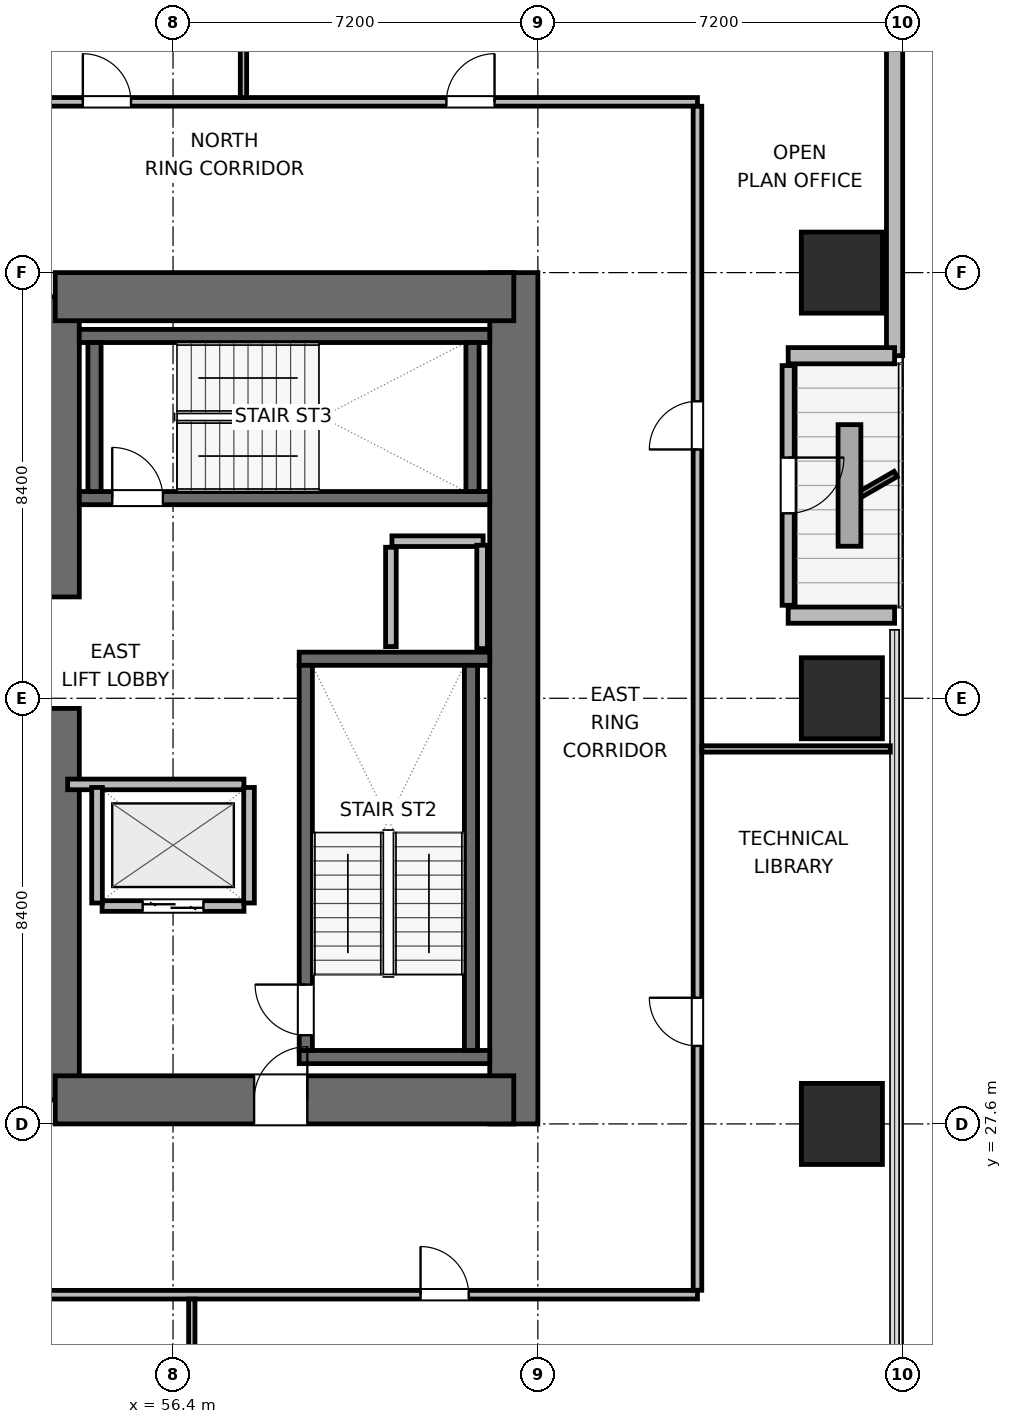
"""IFC4 building model, lengths in metres.
Left out: names, types, materials, properties, quantities, classifications, styles, units other than length and angle.
Written with IfcOpenShell. Run it as: python <this file> out.ifc"""

import sys

from ifc_helpers import new_model, si_unit, direction, frame, frame_2d, origin, origin_2d, place, context, subcontext, project, spatial, rectangle, extrude, element, fill, save


model = new_model("IFC4")
c1 = context("Model", 3, precision=1e-05, world=origin(), true_north=direction((0.0, 1.0)))
c2 = subcontext(c1, "Body", "Model", "MODEL_VIEW")
j1 = project(units=[si_unit("LENGTHUNIT", "METRE"), si_unit("PLANEANGLEUNIT", "RADIAN")], contexts=[c1])
p1 = place(None, origin())
s1 = spatial("IfcSite", under=j1, at=p1, CompositionType="ELEMENT")
p2 = place(p1, origin())
s2 = spatial("IfcBuilding", under=s1, at=p2, CompositionType="ELEMENT")
p3 = place(p2, frame((0.0, 0.0, 85.8)))
s3 = spatial("IfcBuildingStorey", under=s2, at=p3, CompositionType="ELEMENT", Elevation=85.8)
p4 = place(p3, frame((54.075, 28.075, 0.0), z_axis=(0.0, 0.0, 1.0), x_axis=(0.0, 1.0, 0.0)))
e1 = element("IfcWall", 1, at=p4, inside=s3, PredefinedType="SHEAR", context=c2, shape_type="SweptSolid", body=[
    extrude(rectangle(XDim=7.725, YDim=0.95, at=frame_2d((3.863, 0.0))), origin(), (0.0, 0.0, 1.0), 3.9),
])
p5 = place(p3, frame((54.075, 38.0, 0.0), z_axis=(0.0, 0.0, 1.0), x_axis=(0.0, 1.0, 0.0)))
e2 = element("IfcWall", 2, at=p5, inside=s3, PredefinedType="SHEAR", context=c2, shape_type="SweptSolid", body=[
    extrude(rectangle(XDim=5.925, YDim=0.95, at=frame_2d((2.962, 0.0))), origin(), (0.0, 0.0, 1.0), 3.9),
])
p6 = place(p3, frame((63.125, 27.6, 0.0), z_axis=(0.0, 0.0, 1.0), x_axis=(0.0, 1.0, 0.0)))
e3 = element("IfcWall", 3, at=p6, inside=s3, PredefinedType="SHEAR", context=c2, shape_type="SweptSolid", body=[
    extrude(rectangle(XDim=16.8, YDim=0.95, at=frame_2d((8.4, 0.0))), origin(), (0.0, 0.0, 1.0), 3.9),
])
p7 = place(p3, frame((54.075, 28.075, 0.0), z_axis=(0.0, 0.0, 1.0), x_axis=(1.0, 0.0, 0.0)))
e4 = element("IfcWall", 4, at=p7, inside=s3, PredefinedType="SHEAR", context=c2, shape_type="SweptSolid", body=[
    extrude(rectangle(XDim=9.05, YDim=0.95, at=frame_2d((4.525, 0.0))), origin(), (0.0, 0.0, 1.0), 3.9),
])
p8 = place(p7, frame((3.925, 0.0, 0.0)))
e5 = element("IfcOpeningElement", 5, at=p8, cuts=e4, PredefinedType="OPENING", context=c2, shape_type="SweptSolid", body=[
    extrude(rectangle(XDim=1.05, YDim=2.04, at=frame_2d((0.525, 1.02))), frame((0.0, 0.485, 0.0), z_axis=(0.0, -1.0, 0.0), x_axis=(1.0, 0.0, 0.0)), (0.0, 0.0, 1.0), 0.97),
])
p9 = place(p3, frame((54.075, 43.925, 0.0), z_axis=(0.0, 0.0, 1.0), x_axis=(1.0, 0.0, 0.0)))
e6 = element("IfcWall", 6, at=p9, inside=s3, PredefinedType="SHEAR", context=c2, shape_type="SweptSolid", body=[
    extrude(rectangle(XDim=9.05, YDim=0.95, at=frame_2d((4.525, 0.0))), origin(), (0.0, 0.0, 1.0), 3.9),
])
for number, where, z_axis, x_axis in (
    (7, (58.89, 28.92, 0.0), (0.0, 0.0, 1.0), (1.0, 0.0, 0.0)),
    (8, (58.89, 36.78, 0.0), (0.0, 0.0, 1.0), (1.0, 0.0, 0.0)),
):
    element("IfcWall", number, at=place(p3, frame(where, z_axis=z_axis, x_axis=x_axis)), inside=s3, PredefinedType="SHEAR", context=c2, shape_type="SweptSolid", body=[
        extrude(rectangle(XDim=3.76, YDim=0.26, at=frame_2d((1.88, 0.0))), origin(), (0.0, 0.0, 1.0), 3.9),
    ])
p10 = place(p3, frame((59.02, 29.05, 0.0), z_axis=(0.0, 0.0, 1.0), x_axis=(0.0, 1.0, 0.0)))
e9 = element("IfcWall", 9, at=p10, inside=s3, PredefinedType="SHEAR", context=c2, shape_type="SweptSolid", body=[
    extrude(rectangle(XDim=7.6, YDim=0.26, at=frame_2d((3.8, 0.0))), origin(), (0.0, 0.0, 1.0), 3.9),
])
p11 = place(p10, frame((0.3, 0.0, 0.0)))
e10 = element("IfcOpeningElement", 10, at=p11, cuts=e9, PredefinedType="OPENING", context=c2, shape_type="SweptSolid", body=[
    extrude(rectangle(XDim=1.0, YDim=2.04, at=frame_2d((0.5, 1.02))), frame((0.0, 0.14, 0.0), z_axis=(0.0, -1.0, 0.0), x_axis=(1.0, 0.0, 0.0)), (0.0, 0.0, 1.0), 0.28),
])
p12 = place(p3, frame((62.28, 29.05, 0.0), z_axis=(0.0, 0.0, 1.0), x_axis=(0.0, 1.0, 0.0)))
e11 = element("IfcWall", 11, at=p12, inside=s3, PredefinedType="SHEAR", context=c2, shape_type="SweptSolid", body=[
    extrude(rectangle(XDim=7.6, YDim=0.26, at=frame_2d((3.8, 0.0))), origin(), (0.0, 0.0, 1.0), 3.9),
])
p13 = place(p3, frame((54.55, 39.95, 0.0), z_axis=(0.0, 0.0, 1.0), x_axis=(1.0, 0.0, 0.0)))
e12 = element("IfcWall", 12, at=p13, inside=s3, PredefinedType="SHEAR", context=c2, shape_type="SweptSolid", body=[
    extrude(rectangle(XDim=8.1, YDim=0.26, at=frame_2d((4.05, 0.0))), origin(), (0.0, 0.0, 1.0), 3.9),
])
p14 = place(p13, frame((0.65, 0.0, 0.0)))
e13 = element("IfcOpeningElement", 13, at=p14, cuts=e12, PredefinedType="OPENING", context=c2, shape_type="SweptSolid", body=[
    extrude(rectangle(XDim=1.0, YDim=2.04, at=frame_2d((0.5, 1.02))), frame((0.0, 0.14, 0.0), z_axis=(0.0, -1.0, 0.0), x_axis=(1.0, 0.0, 0.0)), (0.0, 0.0, 1.0), 0.28),
])
p15 = place(p3, frame((54.55, 43.15, 0.0), z_axis=(0.0, 0.0, 1.0), x_axis=(1.0, 0.0, 0.0)))
e14 = element("IfcWall", 14, at=p15, inside=s3, PredefinedType="SHEAR", context=c2, shape_type="SweptSolid", body=[
    extrude(rectangle(XDim=8.1, YDim=0.26, at=frame_2d((4.05, 0.0))), origin(), (0.0, 0.0, 1.0), 3.9),
])
for number, where, z_axis, x_axis in (
    (15, (54.85, 40.08, 0.0), (0.0, 0.0, 1.0), (0.0, 1.0, 0.0)),
    (16, (62.31, 40.08, 0.0), (0.0, 0.0, 1.0), (0.0, 1.0, 0.0)),
):
    element("IfcWall", number, at=place(p3, frame(where, z_axis=z_axis, x_axis=x_axis)), inside=s3, PredefinedType="SHEAR", context=c2, shape_type="SweptSolid", body=[
        extrude(rectangle(XDim=2.94, YDim=0.26, at=frame_2d((1.47, 0.0))), origin(), (0.0, 0.0, 1.0), 3.9),
    ])
for number, where, z_axis, x_axis in (
    (17, (69.6, 27.6, 0.0), (0.0, 0.0, 1.0), (1.0, 0.0, 0.0)),
    (18, (69.6, 36.0, 0.0), (0.0, 0.0, 1.0), (1.0, 0.0, 0.0)),
    (19, (69.6, 44.4, 0.0), (0.0, 0.0, 1.0), (1.0, 0.0, 0.0)),
):
    element("IfcColumn", number, at=place(p3, frame(where, z_axis=z_axis, x_axis=x_axis)), inside=s3, PredefinedType="COLUMN", context=c2, shape_type="SweptSolid", body=[
        extrude(rectangle(XDim=1.6, YDim=1.6, at=origin_2d()), origin(), (0.0, 0.0, 1.0), 3.9),
    ])
p16 = place(p3, frame((70.64, 56.979, 0.0), z_axis=(0.0, 0.0, 1.0), x_axis=(0.0, -1.0, 0.0)))
e20 = element("IfcWall", 20, at=p16, inside=s3, PredefinedType="SOLIDWALL", context=c2, shape_type="SweptSolid", body=[
    extrude(rectangle(XDim=14.219, YDim=0.32, at=frame_2d((7.109, 0.0))), origin(), (0.0, 0.0, 1.0), 3.64),
])
p17 = place(p3, frame((70.64, 42.76, 0.0), z_axis=(0.0, 0.0, 1.0), x_axis=(-1.0, 0.0, 0.0)))
e21 = element("IfcWall", 21, at=p17, inside=s3, PredefinedType="SOLIDWALL", context=c2, shape_type="SweptSolid", body=[
    extrude(rectangle(XDim=2.1, YDim=0.32, at=frame_2d((1.05, 0.0))), origin(), (0.0, 0.0, 1.0), 2.875),
])
p18 = place(p3, frame((68.54, 42.565, 0.0), z_axis=(0.0, 0.0, 1.0), x_axis=(0.0, -1.0, 0.0)))
e22 = element("IfcWall", 22, at=p18, inside=s3, PredefinedType="SOLIDWALL", context=c2, shape_type="SweptSolid", body=[
    extrude(rectangle(XDim=4.73, YDim=0.24, at=frame_2d((2.365, 0.0))), origin(), (0.0, 0.0, 1.0), 3.162),
])
p19 = place(p18, frame((1.815, 0.0, 0.0)))
e23 = element("IfcOpeningElement", 23, at=p19, cuts=e22, PredefinedType="OPENING", context=c2, shape_type="SweptSolid", body=[
    extrude(rectangle(XDim=1.1, YDim=2.04, at=frame_2d((0.55, 1.02))), frame((0.0, 0.13, 0.0), z_axis=(0.0, -1.0, 0.0), x_axis=(1.0, 0.0, 0.0)), (0.0, 0.0, 1.0), 0.26),
])
p20 = place(p3, frame((68.54, 37.64, 0.0), z_axis=(0.0, 0.0, 1.0), x_axis=(1.0, 0.0, 0.0)))
e24 = element("IfcWall", 24, at=p20, inside=s3, PredefinedType="SOLIDWALL", context=c2, shape_type="SweptSolid", body=[
    extrude(rectangle(XDim=2.1, YDim=0.32, at=frame_2d((1.05, 0.0))), origin(), (0.0, 0.0, 1.0), 2.875),
])
p21 = place(p3, frame((60.72, 39.1, 0.0), z_axis=(0.0, 0.0, 1.0), x_axis=(1.0, 0.0, 0.0)))
e25 = element("IfcWall", 25, at=p21, inside=s3, PredefinedType="PARTITIONING", context=c2, shape_type="SweptSolid", body=[
    extrude(rectangle(XDim=1.8, YDim=0.21, at=frame_2d((0.9, 0.0))), origin(), (0.0, 0.0, 1.0), 3.64),
])
p22 = place(p3, frame((60.7, 37.02, 0.0), z_axis=(0.0, 0.0, 1.0), x_axis=(0.0, 1.0, 0.0)))
e26 = element("IfcWall", 26, at=p22, inside=s3, PredefinedType="PARTITIONING", context=c2, shape_type="SweptSolid", body=[
    extrude(rectangle(XDim=1.96, YDim=0.21, at=frame_2d((0.98, 0.0))), origin(), (0.0, 0.0, 1.0), 3.64),
])
p23 = place(p3, frame((62.5, 36.98, 0.0), z_axis=(0.0, 0.0, 1.0), x_axis=(0.0, 1.0, 0.0)))
e27 = element("IfcWall", 27, at=p23, inside=s3, PredefinedType="PARTITIONING", context=c2, shape_type="SweptSolid", body=[
    extrude(rectangle(XDim=2.04, YDim=0.21, at=frame_2d((1.02, 0.0))), origin(), (0.0, 0.0, 1.0), 3.64),
])
p24 = place(p3, frame((55.0, 31.9, 0.0), z_axis=(0.0, 0.0, 1.0), x_axis=(1.0, 0.0, 0.0)))
e28 = element("IfcWall", 28, at=p24, inside=s3, PredefinedType="PARTITIONING", context=c2, shape_type="SweptSolid", body=[
    extrude(rectangle(XDim=2.8, YDim=0.21, at=frame_2d((1.4, 0.0))), origin(), (0.0, 0.0, 1.0), 3.64),
])
p25 = place(p24, frame((0.8, 0.0, 0.0)))
e29 = element("IfcOpeningElement", 29, at=p25, cuts=e28, PredefinedType="OPENING", context=c2, shape_type="SweptSolid", body=[
    extrude(rectangle(XDim=1.2, YDim=2.04, at=frame_2d((0.6, 1.02))), frame((0.0, 0.115, 0.0), z_axis=(0.0, -1.0, 0.0), x_axis=(1.0, 0.0, 0.0)), (0.0, 0.0, 1.0), 0.23),
])
p26 = place(p3, frame((54.32, 34.3, 0.0), z_axis=(0.0, 0.0, 1.0), x_axis=(1.0, 0.0, 0.0)))
e30 = element("IfcWall", 30, at=p26, inside=s3, PredefinedType="PARTITIONING", context=c2, shape_type="SweptSolid", body=[
    extrude(rectangle(XDim=3.48, YDim=0.21, at=frame_2d((1.74, 0.0))), origin(), (0.0, 0.0, 1.0), 3.64),
])
for number, where, z_axis, x_axis in (
    (31, (54.9, 31.96, 0.0), (0.0, 0.0, 1.0), (0.0, 1.0, 0.0)),
    (32, (57.9, 31.96, 0.0), (0.0, 0.0, 1.0), (0.0, 1.0, 0.0)),
):
    element("IfcWall", number, at=place(p3, frame(where, z_axis=z_axis, x_axis=x_axis)), inside=s3, PredefinedType="PARTITIONING", context=c2, shape_type="SweptSolid", body=[
        extrude(rectangle(XDim=2.28, YDim=0.21, at=frame_2d((1.14, 0.0))), origin(), (0.0, 0.0, 1.0), 3.64),
    ])
p27 = place(p3, frame((29.25, 24.23, 0.0), z_axis=(0.0, 0.0, 1.0), x_axis=(1.0, 0.0, 0.0)))
e33 = element("IfcWall", 33, at=p27, inside=s3, PredefinedType="PARTITIONING", context=c2, shape_type="SweptSolid", body=[
    extrude(rectangle(XDim=37.5, YDim=0.17, at=frame_2d((18.75, 0.0))), origin(), (0.0, 0.0, 1.0), 3.64),
])
p28 = place(p27, frame((4.51, 0.0, 0.0)))
e34 = element("IfcOpeningElement", 34, at=p28, cuts=e33, PredefinedType="OPENING", context=c2, shape_type="SweptSolid", body=[
    extrude(rectangle(XDim=0.95, YDim=2.04, at=frame_2d((0.475, 1.02))), frame((0.0, 0.095, 0.0), z_axis=(0.0, -1.0, 0.0), x_axis=(1.0, 0.0, 0.0)), (0.0, 0.0, 1.0), 0.19),
])
p29 = place(p27, frame((13.885, 0.0, 0.0)))
e35 = element("IfcOpeningElement", 35, at=p29, cuts=e33, PredefinedType="OPENING", context=c2, shape_type="SweptSolid", body=[
    extrude(rectangle(XDim=0.95, YDim=2.04, at=frame_2d((0.475, 1.02))), frame((0.0, 0.095, 0.0), z_axis=(0.0, -1.0, 0.0), x_axis=(1.0, 0.0, 0.0)), (0.0, 0.0, 1.0), 0.19),
])
p30 = place(p27, frame((22.66, 0.0, 0.0)))
e36 = element("IfcOpeningElement", 36, at=p30, cuts=e33, PredefinedType="OPENING", context=c2, shape_type="SweptSolid", body=[
    extrude(rectangle(XDim=0.95, YDim=2.04, at=frame_2d((0.475, 1.02))), frame((0.0, 0.095, 0.0), z_axis=(0.0, -1.0, 0.0), x_axis=(1.0, 0.0, 0.0)), (0.0, 0.0, 1.0), 0.19),
])
p31 = place(p27, frame((32.035, 0.0, 0.0)))
e37 = element("IfcOpeningElement", 37, at=p31, cuts=e33, PredefinedType="OPENING", context=c2, shape_type="SweptSolid", body=[
    extrude(rectangle(XDim=0.95, YDim=2.04, at=frame_2d((0.475, 1.02))), frame((0.0, 0.095, 0.0), z_axis=(0.0, -1.0, 0.0), x_axis=(1.0, 0.0, 0.0)), (0.0, 0.0, 1.0), 0.19),
])
p32 = place(p3, frame((29.25, 47.77, 0.0), z_axis=(0.0, 0.0, 1.0), x_axis=(1.0, 0.0, 0.0)))
e38 = element("IfcWall", 38, at=p32, inside=s3, PredefinedType="PARTITIONING", context=c2, shape_type="SweptSolid", body=[
    extrude(rectangle(XDim=37.5, YDim=0.17, at=frame_2d((18.75, 0.0))), origin(), (0.0, 0.0, 1.0), 3.64),
])
p33 = place(p32, frame((4.005, 0.0, 0.0)))
e39 = element("IfcOpeningElement", 39, at=p33, cuts=e38, PredefinedType="OPENING", context=c2, shape_type="SweptSolid", body=[
    extrude(rectangle(XDim=0.95, YDim=2.04, at=frame_2d((0.475, 1.02))), frame((0.0, 0.095, 0.0), z_axis=(0.0, -1.0, 0.0), x_axis=(1.0, 0.0, 0.0)), (0.0, 0.0, 1.0), 0.19),
])
p34 = place(p32, frame((10.07, 0.0, 0.0)))
e40 = element("IfcOpeningElement", 40, at=p34, cuts=e38, PredefinedType="OPENING", context=c2, shape_type="SweptSolid", body=[
    extrude(rectangle(XDim=0.95, YDim=2.04, at=frame_2d((0.475, 1.02))), frame((0.0, 0.095, 0.0), z_axis=(0.0, -1.0, 0.0), x_axis=(1.0, 0.0, 0.0)), (0.0, 0.0, 1.0), 0.19),
])
p35 = place(p32, frame((17.165, 0.0, 0.0)))
e41 = element("IfcOpeningElement", 41, at=p35, cuts=e38, PredefinedType="OPENING", context=c2, shape_type="SweptSolid", body=[
    extrude(rectangle(XDim=0.95, YDim=2.04, at=frame_2d((0.475, 1.02))), frame((0.0, 0.095, 0.0), z_axis=(0.0, -1.0, 0.0), x_axis=(1.0, 0.0, 0.0)), (0.0, 0.0, 1.0), 0.19),
])
p36 = place(p32, frame((25.37, 0.0, 0.0)))
e42 = element("IfcOpeningElement", 42, at=p36, cuts=e38, PredefinedType="OPENING", context=c2, shape_type="SweptSolid", body=[
    extrude(rectangle(XDim=0.95, YDim=2.04, at=frame_2d((0.475, 1.02))), frame((0.0, 0.095, 0.0), z_axis=(0.0, -1.0, 0.0), x_axis=(1.0, 0.0, 0.0)), (0.0, 0.0, 1.0), 0.19),
])
p37 = place(p32, frame((32.545, 0.0, 0.0)))
e43 = element("IfcOpeningElement", 43, at=p37, cuts=e38, PredefinedType="OPENING", context=c2, shape_type="SweptSolid", body=[
    extrude(rectangle(XDim=0.95, YDim=2.04, at=frame_2d((0.475, 1.02))), frame((0.0, 0.095, 0.0), z_axis=(0.0, -1.0, 0.0), x_axis=(1.0, 0.0, 0.0)), (0.0, 0.0, 1.0), 0.19),
])
p38 = place(p3, frame((66.75, 24.317, 0.0), z_axis=(0.0, 0.0, 1.0), x_axis=(0.0, 1.0, 0.0)))
e44 = element("IfcWall", 44, at=p38, inside=s3, PredefinedType="PARTITIONING", context=c2, shape_type="SweptSolid", body=[
    extrude(rectangle(XDim=23.366, YDim=0.17, at=frame_2d((11.683, 0.0))), origin(), (0.0, 0.0, 1.0), 3.64),
])
p39 = place(p38, frame((4.823, 0.0, 0.0)))
e45 = element("IfcOpeningElement", 45, at=p39, cuts=e44, PredefinedType="OPENING", context=c2, shape_type="SweptSolid", body=[
    extrude(rectangle(XDim=0.95, YDim=2.04, at=frame_2d((0.475, 1.02))), frame((0.0, 0.095, 0.0), z_axis=(0.0, -1.0, 0.0), x_axis=(1.0, 0.0, 0.0)), (0.0, 0.0, 1.0), 0.19),
])
p40 = place(p38, frame((16.593, 0.0, 0.0)))
e46 = element("IfcOpeningElement", 46, at=p40, cuts=e44, PredefinedType="OPENING", context=c2, shape_type="SweptSolid", body=[
    extrude(rectangle(XDim=0.95, YDim=2.04, at=frame_2d((0.475, 1.02))), frame((0.0, 0.095, 0.0), z_axis=(0.0, -1.0, 0.0), x_axis=(1.0, 0.0, 0.0)), (0.0, 0.0, 1.0), 0.19),
])
for number, where, z_axis, x_axis in (
    (47, (56.77, 9.915, 0.0), (0.0, 0.0, 1.0), (0.0, 1.0, 0.0)),
    (48, (57.79, 47.857, 0.0), (0.0, 0.0, 1.0), (0.0, 1.0, 0.0)),
):
    element("IfcWall", number, at=place(p3, frame(where, z_axis=z_axis, x_axis=x_axis)), inside=s3, PredefinedType="PARTITIONING", context=c2, shape_type="SweptSolid", body=[
        extrude(rectangle(XDim=14.228, YDim=0.125, at=frame_2d((7.114, 0.0))), origin(), (0.0, 0.0, 1.0), 3.64),
    ])
p41 = place(p3, frame((66.837, 35.0, 0.0), z_axis=(0.0, 0.0, 1.0), x_axis=(1.0, 0.0, 0.0)))
e49 = element("IfcWall", 49, at=p41, inside=s3, PredefinedType="PARTITIONING", context=c2, shape_type="SweptSolid", body=[
    extrude(rectangle(XDim=3.718, YDim=0.125, at=frame_2d((1.859, 0.0))), origin(), (0.0, 0.0, 1.0), 3.64),
])
p42 = place(p19, origin())
e50 = element("IfcDoor", 50, at=p42, inside=s3, OperationType="SINGLE_SWING_LEFT", PredefinedType="DOOR", context=c2, shape_type="SweptSolid", body=[
    extrude(rectangle(XDim=1.1, YDim=2.04, at=frame_2d((0.55, 1.02))), frame((0.0, 0.025, 0.0), z_axis=(0.0, -1.0, 0.0), x_axis=(1.0, 0.0, 0.0)), (0.0, 0.0, 1.0), 0.05),
])
fill(e23, e50)
p43 = place(p11, origin())
e51 = element("IfcDoor", 51, at=p43, inside=s3, OperationType="SINGLE_SWING_RIGHT", PredefinedType="DOOR", context=c2, shape_type="SweptSolid", body=[
    extrude(rectangle(XDim=1.0, YDim=2.04, at=frame_2d((0.5, 1.02))), frame((0.0, 0.025, 0.0), z_axis=(0.0, -1.0, 0.0), x_axis=(1.0, 0.0, 0.0)), (0.0, 0.0, 1.0), 0.05),
])
fill(e10, e51)
p44 = place(p14, origin())
e52 = element("IfcDoor", 52, at=p44, inside=s3, OperationType="SINGLE_SWING_LEFT", PredefinedType="DOOR", context=c2, shape_type="SweptSolid", body=[
    extrude(rectangle(XDim=1.0, YDim=2.04, at=frame_2d((0.5, 1.02))), frame((0.0, 0.025, 0.0), z_axis=(0.0, -1.0, 0.0), x_axis=(1.0, 0.0, 0.0)), (0.0, 0.0, 1.0), 0.05),
])
fill(e13, e52)
p45 = place(p25, origin())
e53 = element("IfcDoor", 53, at=p45, inside=s3, OperationType="DOUBLE_DOOR_SLIDING", PredefinedType="DOOR", context=c2, shape_type="SweptSolid", body=[
    extrude(rectangle(XDim=1.2, YDim=2.04, at=frame_2d((0.6, 1.02))), frame((0.0, 0.025, 0.0), z_axis=(0.0, -1.0, 0.0), x_axis=(1.0, 0.0, 0.0)), (0.0, 0.0, 1.0), 0.05),
])
fill(e29, e53)
p46 = place(p8, origin())
e54 = element("IfcDoor", 54, at=p46, inside=s3, OperationType="SINGLE_SWING_RIGHT", PredefinedType="DOOR", context=c2, shape_type="SweptSolid", body=[
    extrude(rectangle(XDim=1.05, YDim=2.04, at=frame_2d((0.525, 1.02))), frame((0.0, 0.025, 0.0), z_axis=(0.0, -1.0, 0.0), x_axis=(1.0, 0.0, 0.0)), (0.0, 0.0, 1.0), 0.05),
])
fill(e5, e54)
p47 = place(p31, origin())
e55 = element("IfcDoor", 55, at=p47, inside=s3, OperationType="SINGLE_SWING_LEFT", PredefinedType="DOOR", context=c2, shape_type="SweptSolid", body=[
    extrude(rectangle(XDim=0.95, YDim=2.04, at=frame_2d((0.475, 1.02))), frame((0.0, 0.025, 0.0), z_axis=(0.0, -1.0, 0.0), x_axis=(1.0, 0.0, 0.0)), (0.0, 0.0, 1.0), 0.05),
])
fill(e37, e55)
p48 = place(p36, origin())
e56 = element("IfcDoor", 56, at=p48, inside=s3, OperationType="SINGLE_SWING_LEFT", PredefinedType="DOOR", context=c2, shape_type="SweptSolid", body=[
    extrude(rectangle(XDim=0.95, YDim=2.04, at=frame_2d((0.475, 1.02))), frame((0.0, 0.025, 0.0), z_axis=(0.0, -1.0, 0.0), x_axis=(1.0, 0.0, 0.0)), (0.0, 0.0, 1.0), 0.05),
])
fill(e42, e56)
p49 = place(p37, origin())
e57 = element("IfcDoor", 57, at=p49, inside=s3, OperationType="SINGLE_SWING_RIGHT", PredefinedType="DOOR", context=c2, shape_type="SweptSolid", body=[
    extrude(rectangle(XDim=0.95, YDim=2.04, at=frame_2d((0.475, 1.02))), frame((0.0, 0.025, 0.0), z_axis=(0.0, -1.0, 0.0), x_axis=(1.0, 0.0, 0.0)), (0.0, 0.0, 1.0), 0.05),
])
fill(e43, e57)
p50 = place(p39, origin())
e58 = element("IfcDoor", 58, at=p50, inside=s3, OperationType="SINGLE_SWING_RIGHT", PredefinedType="DOOR", context=c2, shape_type="SweptSolid", body=[
    extrude(rectangle(XDim=0.95, YDim=2.04, at=frame_2d((0.475, 1.02))), frame((0.0, 0.025, 0.0), z_axis=(0.0, -1.0, 0.0), x_axis=(1.0, 0.0, 0.0)), (0.0, 0.0, 1.0), 0.05),
])
fill(e45, e58)
p51 = place(p40, origin())
e59 = element("IfcDoor", 59, at=p51, inside=s3, OperationType="SINGLE_SWING_LEFT", PredefinedType="DOOR", context=c2, shape_type="SweptSolid", body=[
    extrude(rectangle(XDim=0.95, YDim=2.04, at=frame_2d((0.475, 1.02))), frame((0.0, 0.025, 0.0), z_axis=(0.0, -1.0, 0.0), x_axis=(1.0, 0.0, 0.0)), (0.0, 0.0, 1.0), 0.05),
])
fill(e46, e59)
save(model, sys.argv[1])
